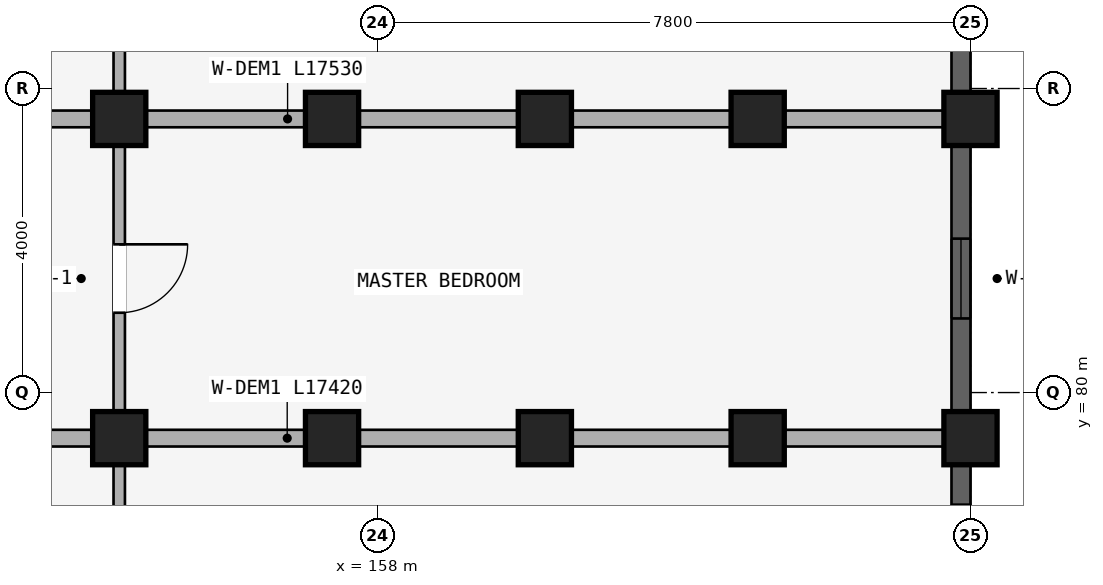
"""IFC4 building model, lengths in metres.
Left out: names, types, materials, properties, quantities, classifications, styles, units other than length and angle.
Written with IfcOpenShell. Run it as: python <this file> out.ifc"""

import sys

from ifc_helpers import new_model, si_unit, direction, frame, frame_2d, origin, origin_2d, place, context, subcontext, project, spatial, rectangle, extrude, element, fill, save


model = new_model("IFC4")
c1 = context("Model", 3, precision=1e-05, world=origin(), true_north=direction((0.0, 1.0)))
c2 = subcontext(c1, "Body", "Model", "MODEL_VIEW")
j1 = project(units=[si_unit("LENGTHUNIT", "METRE"), si_unit("PLANEANGLEUNIT", "RADIAN")], contexts=[c1])
p1 = place(None, origin())
s1 = spatial("IfcSite", under=j1, at=p1, CompositionType="ELEMENT")
p2 = place(p1, origin())
s2 = spatial("IfcBuilding", under=s1, at=p2, CompositionType="ELEMENT")
p3 = place(p2, frame((0.0, 0.0, 21.3)))
s3 = spatial("IfcBuildingStorey", under=s2, at=p3, CompositionType="ELEMENT", Elevation=21.3)
for number, where, z_axis, x_axis in (
    (1, (154.6, 83.6, 0.0), (0.0, 0.0, 1.0), (1.0, 0.0, 0.0)),
    (2, (157.4, 83.6, 0.0), (0.0, 0.0, 1.0), (1.0, 0.0, 0.0)),
    (3, (160.2, 83.6, 0.0), (0.0, 0.0, 1.0), (1.0, 0.0, 0.0)),
    (4, (163.0, 83.6, 0.0), (0.0, 0.0, 1.0), (1.0, 0.0, 0.0)),
    (5, (165.8, 83.6, 0.0), (0.0, 0.0, 1.0), (1.0, 0.0, 0.0)),
    (6, (154.6, 79.4, 0.0), (0.0, 0.0, 1.0), (1.0, 0.0, 0.0)),
    (7, (157.4, 79.4, 0.0), (0.0, 0.0, 1.0), (1.0, 0.0, 0.0)),
    (8, (160.2, 79.4, 0.0), (0.0, 0.0, 1.0), (1.0, 0.0, 0.0)),
    (9, (163.0, 79.4, 0.0), (0.0, 0.0, 1.0), (1.0, 0.0, 0.0)),
    (10, (165.8, 79.4, 0.0), (0.0, 0.0, 1.0), (1.0, 0.0, 0.0)),
):
    element("IfcColumn", number, at=place(p3, frame(where, z_axis=z_axis, x_axis=x_axis)), inside=s3, PredefinedType="COLUMN", context=c2, shape_type="SweptSolid", body=[
        extrude(rectangle(XDim=0.7, YDim=0.7, at=origin_2d()), origin(), (0.0, 0.0, 1.0), 2.93),
    ])
p4 = place(p3, frame((154.6, 87.57, 0.0), z_axis=(0.0, 0.0, 1.0), x_axis=(0.0, -1.0, 0.0)))
e11 = element("IfcWall", 11, at=p4, inside=s3, PredefinedType="PARTITIONING", context=c2, shape_type="SweptSolid", body=[
    extrude(rectangle(XDim=3.89, YDim=0.15, at=frame_2d((1.945, 0.0))), origin(), (0.0, 0.0, 1.0), 2.372),
])
p5 = place(p4, frame((1.495, 0.0, 0.0)))
e12 = element("IfcOpeningElement", 12, at=p5, cuts=e11, PredefinedType="OPENING", context=c2, shape_type="SweptSolid", body=[
    extrude(rectangle(XDim=0.9, YDim=2.1, at=frame_2d((0.45, 1.05))), frame((0.0, 0.085, 0.0), z_axis=(0.0, -1.0, 0.0), x_axis=(1.0, 0.0, 0.0)), (0.0, 0.0, 1.0), 0.17),
])
p6 = place(p3, frame((154.6, 83.52, 0.0), z_axis=(0.0, 0.0, 1.0), x_axis=(0.0, -1.0, 0.0)))
e13 = element("IfcWall", 13, at=p6, inside=s3, PredefinedType="PARTITIONING", context=c2, shape_type="SweptSolid", body=[
    extrude(rectangle(XDim=4.04, YDim=0.15, at=frame_2d((2.02, 0.0))), origin(), (0.0, 0.0, 1.0), 2.372),
])
p7 = place(p6, frame((1.57, 0.0, 0.0)))
e14 = element("IfcOpeningElement", 14, at=p7, cuts=e13, PredefinedType="OPENING", context=c2, shape_type="SweptSolid", body=[
    extrude(rectangle(XDim=0.9, YDim=2.1, at=frame_2d((0.45, 1.05))), frame((0.0, 0.085, 0.0), z_axis=(0.0, -1.0, 0.0), x_axis=(1.0, 0.0, 0.0)), (0.0, 0.0, 1.0), 0.17),
])
p8 = place(p3, frame((148.05, 83.6, 0.0), z_axis=(0.0, 0.0, 1.0), x_axis=(1.0, 0.0, 0.0)))
e15 = element("IfcWall", 15, at=p8, inside=s3, PredefinedType="STANDARD", context=c2, shape_type="SweptSolid", body=[
    extrude(rectangle(XDim=17.53, YDim=0.22, at=frame_2d((8.765, 0.0))), origin(), (0.0, 0.0, 1.0), 2.372),
])
p9 = place(p3, frame((154.6, 79.32, 0.0), z_axis=(0.0, 0.0, 1.0), x_axis=(0.0, -1.0, 0.0)))
e16 = element("IfcWall", 16, at=p9, inside=s3, PredefinedType="PLUMBINGWALL", context=c2, shape_type="SweptSolid", body=[
    extrude(rectangle(XDim=2.64, YDim=0.15, at=frame_2d((1.32, 0.0))), origin(), (0.0, 0.0, 1.0), 2.372),
])
p10 = place(p9, frame((0.87, 0.0, 0.0)))
e17 = element("IfcOpeningElement", 17, at=p10, cuts=e16, PredefinedType="OPENING", context=c2, shape_type="SweptSolid", body=[
    extrude(rectangle(XDim=0.9, YDim=2.1, at=frame_2d((0.45, 1.05))), frame((0.0, 0.085, 0.0), z_axis=(0.0, -1.0, 0.0), x_axis=(1.0, 0.0, 0.0)), (0.0, 0.0, 1.0), 0.17),
])
p11 = place(p3, frame((148.1, 79.4, 0.0), z_axis=(0.0, 0.0, 1.0), x_axis=(1.0, 0.0, 0.0)))
e18 = element("IfcWall", 18, at=p11, inside=s3, PredefinedType="STANDARD", context=c2, shape_type="SweptSolid", body=[
    extrude(rectangle(XDim=17.42, YDim=0.22, at=frame_2d((8.71, 0.0))), origin(), (0.0, 0.0, 1.0), 2.372),
])
p12 = place(p3, frame((165.675, 87.447, 0.0), z_axis=(0.0, 0.0, 1.0), x_axis=(0.0, -1.0, 0.0)))
e19 = element("IfcWall", 19, at=p12, inside=s3, PredefinedType="STANDARD", context=c2, shape_type="SweptSolid", body=[
    extrude(rectangle(XDim=3.493, YDim=0.25, at=frame_2d((1.747, 0.0))), origin(), (0.0, 0.0, 1.0), 2.472),
])
p13 = place(p12, frame((1.221, 0.0, 0.88)))
e20 = element("IfcOpeningElement", 20, at=p13, cuts=e19, PredefinedType="OPENING", context=c2, shape_type="SweptSolid", body=[
    extrude(rectangle(XDim=1.05, YDim=1.25, at=frame_2d((0.525, 0.625))), frame((0.0, 0.135, 0.0), z_axis=(0.0, -1.0, 0.0), x_axis=(1.0, 0.0, 0.0)), (0.0, 0.0, 1.0), 0.27),
])
p14 = place(p3, frame((165.675, 83.247, 0.0), z_axis=(0.0, 0.0, 1.0), x_axis=(0.0, -1.0, 0.0)))
e21 = element("IfcWall", 21, at=p14, inside=s3, PredefinedType="STANDARD", context=c2, shape_type="SweptSolid", body=[
    extrude(rectangle(XDim=3.493, YDim=0.25, at=frame_2d((1.747, 0.0))), origin(), (0.0, 0.0, 1.0), 2.472),
])
p15 = place(p14, frame((1.221, 0.0, 0.88)))
e22 = element("IfcOpeningElement", 22, at=p15, cuts=e21, PredefinedType="OPENING", context=c2, shape_type="SweptSolid", body=[
    extrude(rectangle(XDim=1.05, YDim=1.25, at=frame_2d((0.525, 0.625))), frame((0.0, 0.135, 0.0), z_axis=(0.0, -1.0, 0.0), x_axis=(1.0, 0.0, 0.0)), (0.0, 0.0, 1.0), 0.27),
])
p16 = place(p3, frame((165.675, 79.046, 0.0), z_axis=(0.0, 0.0, 1.0), x_axis=(0.0, -1.0, 0.0)))
e23 = element("IfcWall", 23, at=p16, inside=s3, PredefinedType="STANDARD", context=c2, shape_type="SweptSolid", body=[
    extrude(rectangle(XDim=2.093, YDim=0.25, at=frame_2d((1.046, 0.0))), origin(), (0.0, 0.0, 1.0), 2.472),
])
p17 = place(p16, frame((0.521, 0.0, 0.88)))
e24 = element("IfcOpeningElement", 24, at=p17, cuts=e23, PredefinedType="OPENING", context=c2, shape_type="SweptSolid", body=[
    extrude(rectangle(XDim=1.05, YDim=1.25, at=frame_2d((0.525, 0.625))), frame((0.0, 0.135, 0.0), z_axis=(0.0, -1.0, 0.0), x_axis=(1.0, 0.0, 0.0)), (0.0, 0.0, 1.0), 0.27),
])
p18 = place(p15, origin())
e25 = element("IfcWindow", 25, at=p18, inside=s3, PartitioningType="SINGLE_PANEL", PredefinedType="WINDOW", context=c2, shape_type="SweptSolid", body=[
    extrude(rectangle(XDim=1.05, YDim=1.25, at=frame_2d((0.525, 0.625))), frame((0.0, 0.03, 0.0), z_axis=(0.0, -1.0, 0.0), x_axis=(1.0, 0.0, 0.0)), (0.0, 0.0, 1.0), 0.06),
])
fill(e22, e25)
p19 = place(p17, origin())
e26 = element("IfcWindow", 26, at=p19, inside=s3, PartitioningType="SINGLE_PANEL", PredefinedType="WINDOW", context=c2, shape_type="SweptSolid", body=[
    extrude(rectangle(XDim=1.05, YDim=1.25, at=frame_2d((0.525, 0.625))), frame((0.0, 0.03, 0.0), z_axis=(0.0, -1.0, 0.0), x_axis=(1.0, 0.0, 0.0)), (0.0, 0.0, 1.0), 0.06),
])
fill(e24, e26)
p20 = place(p7, origin())
e27 = element("IfcDoor", 27, at=p20, inside=s3, OperationType="SINGLE_SWING_LEFT", PredefinedType="DOOR", context=c2, shape_type="SweptSolid", body=[
    extrude(rectangle(XDim=0.9, YDim=2.1, at=frame_2d((0.45, 1.05))), frame((0.0, 0.025, 0.0), z_axis=(0.0, -1.0, 0.0), x_axis=(1.0, 0.0, 0.0)), (0.0, 0.0, 1.0), 0.05),
])
fill(e14, e27)
save(model, sys.argv[1])
